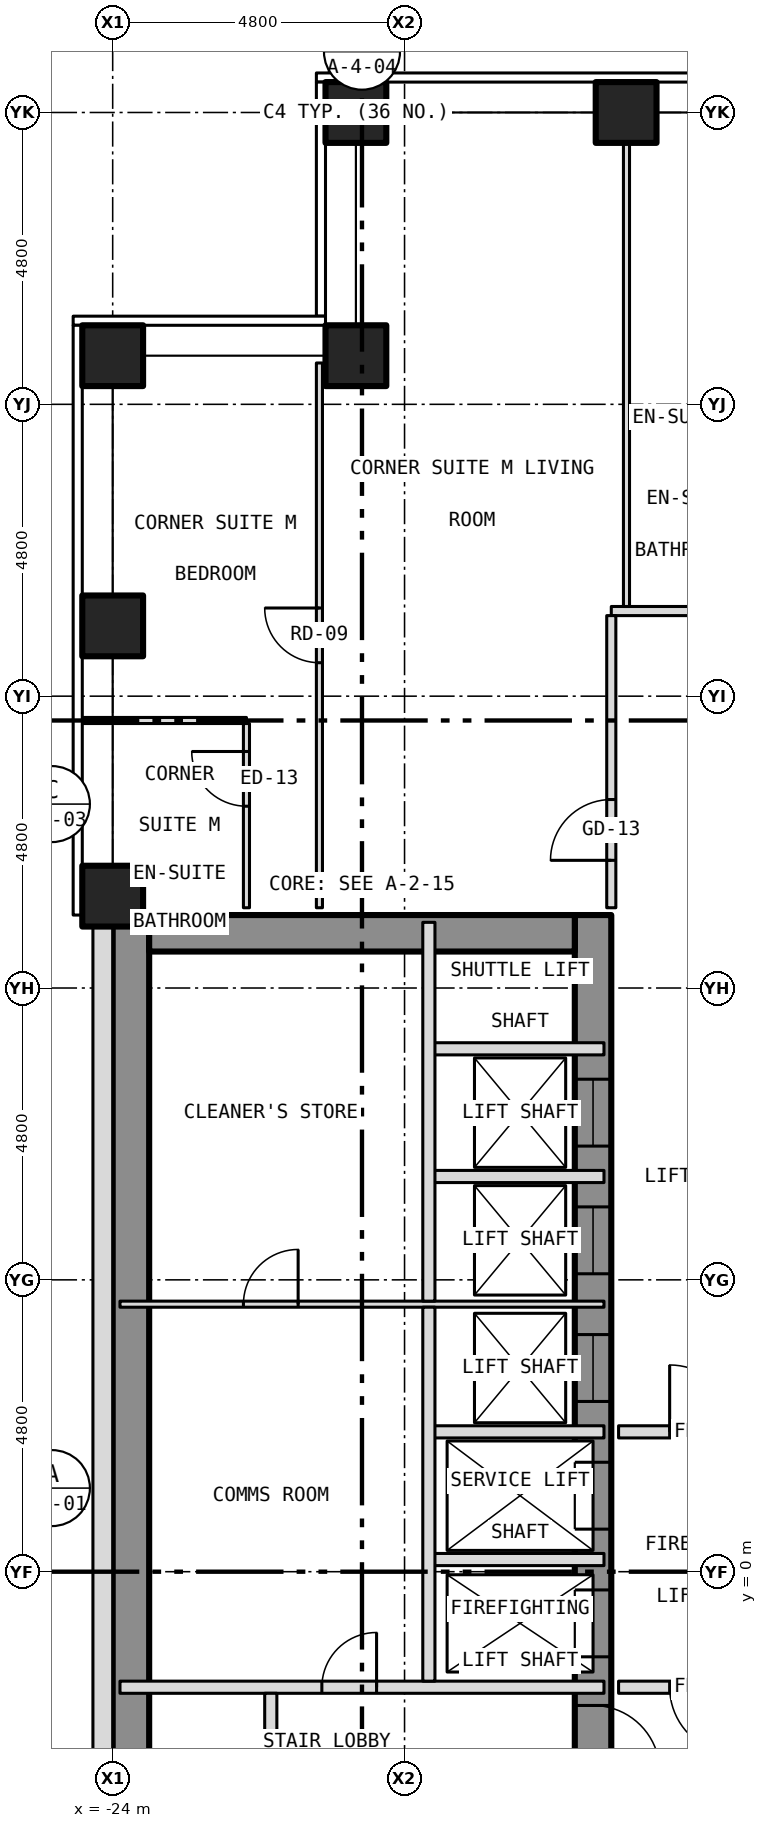
"""IFC4 building model, lengths in metres.
Left out: names, types, materials, properties, quantities, classifications, styles, units other than length and angle.
Written with IfcOpenShell. Run it as: python <this file> out.ifc"""

import sys

from ifc_helpers import new_model, si_unit, direction, frame, frame_2d, origin, origin_2d, place, context, subcontext, project, spatial, rectangle, hollow_rectangle, extrude, element, fill, save


model = new_model("IFC4")
c1 = context("Model", 3, precision=1e-05, world=origin(), true_north=direction((0.0, 1.0)))
c2 = subcontext(c1, "Body", "Model", "MODEL_VIEW")
j1 = project(units=[si_unit("LENGTHUNIT", "METRE"), si_unit("PLANEANGLEUNIT", "RADIAN")], contexts=[c1])
p1 = place(None, origin())
s1 = spatial("IfcSite", under=j1, at=p1, CompositionType="ELEMENT")
p2 = place(p1, origin())
s2 = spatial("IfcBuilding", under=s1, at=p2, CompositionType="ELEMENT")
p3 = place(p2, frame((0.0, 0.0, 56.5)))
s3 = spatial("IfcBuildingStorey", under=s2, at=p3, CompositionType="ELEMENT", Elevation=56.5)
for number, where, z_axis, x_axis in (
    (1, (-20.0, 24.0, -0.15), (0.0, 0.0, 1.0), (1.0, 0.0, 0.0)),
    (2, (-15.556, 24.0, -0.15), (0.0, 0.0, 1.0), (1.0, 0.0, 0.0)),
    (3, (-24.0, 11.111, -0.15), (0.0, 0.0, 1.0), (1.0, 0.0, 0.0)),
    (4, (-24.0, 15.556, -0.15), (0.0, 0.0, 1.0), (1.0, 0.0, 0.0)),
    (5, (-24.0, 20.0, -0.15), (0.0, 0.0, 1.0), (1.0, 0.0, 0.0)),
    (6, (-20.0, 20.0, -0.15), (0.0, 0.0, 1.0), (1.0, 0.0, 0.0)),
):
    element("IfcColumn", number, at=place(p3, frame(where, z_axis=z_axis, x_axis=x_axis)), inside=s3, PredefinedType="COLUMN", context=c2, shape_type="SweptSolid", body=[
        extrude(hollow_rectangle(XDim=1.0, YDim=1.0, WallThickness=0.06, at=origin_2d()), origin(), (0.0, 0.0, 1.0), 3.5),
    ])
p4 = place(p3, frame((-16.1, -10.8, 0.0), z_axis=(0.0, 0.0, 1.0), x_axis=(0.0, 1.0, 0.0)))
e7 = element("IfcWall", 7, at=p4, inside=s3, PredefinedType="SHEAR", context=c2, shape_type="SweptSolid", body=[
    extrude(rectangle(XDim=21.6, YDim=0.6, at=frame_2d((10.8, 0.0))), origin(), (0.0, 0.0, 1.0), 3.25),
])
p5 = place(p4, frame((9.4, 0.0, 0.0)))
e8 = element("IfcOpeningElement", 8, at=p5, cuts=e7, PredefinedType="OPENING", context=c2, shape_type="SweptSolid", body=[
    extrude(rectangle(XDim=1.1, YDim=2.1, at=frame_2d((0.55, 1.05))), frame((0.0, 0.312, 0.0), z_axis=(0.0, -1.0, 0.0), x_axis=(1.0, 0.0, 0.0)), (0.0, 0.0, 1.0), 0.624),
])
p6 = place(p4, frame((11.5, 0.0, 0.0)))
e9 = element("IfcOpeningElement", 9, at=p6, cuts=e7, PredefinedType="OPENING", context=c2, shape_type="SweptSolid", body=[
    extrude(rectangle(XDim=1.1, YDim=2.1, at=frame_2d((0.55, 1.05))), frame((0.0, 0.312, 0.0), z_axis=(0.0, -1.0, 0.0), x_axis=(1.0, 0.0, 0.0)), (0.0, 0.0, 1.0), 0.624),
])
p7 = place(p4, frame((13.6, 0.0, 0.0)))
e10 = element("IfcOpeningElement", 10, at=p7, cuts=e7, PredefinedType="OPENING", context=c2, shape_type="SweptSolid", body=[
    extrude(rectangle(XDim=1.1, YDim=2.1, at=frame_2d((0.55, 1.05))), frame((0.0, 0.312, 0.0), z_axis=(0.0, -1.0, 0.0), x_axis=(1.0, 0.0, 0.0)), (0.0, 0.0, 1.0), 0.624),
])
p8 = place(p4, frame((15.7, 0.0, 0.0)))
e11 = element("IfcOpeningElement", 11, at=p8, cuts=e7, PredefinedType="OPENING", context=c2, shape_type="SweptSolid", body=[
    extrude(rectangle(XDim=1.1, YDim=2.1, at=frame_2d((0.55, 1.05))), frame((0.0, 0.312, 0.0), z_axis=(0.0, -1.0, 0.0), x_axis=(1.0, 0.0, 0.0)), (0.0, 0.0, 1.0), 0.624),
])
p9 = place(p4, frame((17.8, 0.0, 0.0)))
e12 = element("IfcOpeningElement", 12, at=p9, cuts=e7, PredefinedType="OPENING", context=c2, shape_type="SweptSolid", body=[
    extrude(rectangle(XDim=1.1, YDim=2.1, at=frame_2d((0.55, 1.05))), frame((0.0, 0.312, 0.0), z_axis=(0.0, -1.0, 0.0), x_axis=(1.0, 0.0, 0.0)), (0.0, 0.0, 1.0), 0.624),
])
p10 = place(p4, frame((0.758, 0.0, 0.0)))
e13 = element("IfcOpeningElement", 13, at=p10, cuts=e7, PredefinedType="OPENING", context=c2, shape_type="SweptSolid", body=[
    extrude(rectangle(XDim=1.1, YDim=2.1, at=frame_2d((0.55, 1.05))), frame((0.0, 0.312, 0.0), z_axis=(0.0, -1.0, 0.0), x_axis=(1.0, 0.0, 0.0)), (0.0, 0.0, 1.0), 0.624),
])
p11 = place(p4, frame((7.5, 0.0, 0.0)))
e14 = element("IfcOpeningElement", 14, at=p11, cuts=e7, PredefinedType="OPENING", context=c2, shape_type="SweptSolid", body=[
    extrude(rectangle(XDim=1.1, YDim=2.1, at=frame_2d((0.55, 1.05))), frame((0.0, 0.312, 0.0), z_axis=(0.0, -1.0, 0.0), x_axis=(1.0, 0.0, 0.0)), (0.0, 0.0, 1.0), 0.624),
])
p12 = place(p3, frame((-23.7, -10.8, 0.0), z_axis=(0.0, 0.0, 1.0), x_axis=(0.0, 1.0, 0.0)))
e15 = element("IfcWall", 15, at=p12, inside=s3, PredefinedType="SHEAR", context=c2, shape_type="SweptSolid", body=[
    extrude(rectangle(XDim=21.6, YDim=0.6, at=frame_2d((10.8, 0.0))), origin(), (0.0, 0.0, 1.0), 3.25),
])
p13 = place(p3, frame((-23.4, 10.5, 0.0), z_axis=(0.0, 0.0, 1.0), x_axis=(1.0, 0.0, 0.0)))
e16 = element("IfcWall", 16, at=p13, inside=s3, PredefinedType="SHEAR", context=c2, shape_type="SweptSolid", body=[
    extrude(rectangle(XDim=7.0, YDim=0.6, at=frame_2d((3.5, 0.0))), origin(), (0.0, 0.0, 1.0), 3.25),
])
p14 = place(p3, frame((-24.163, 10.8, 0.0), z_axis=(0.0, 0.0, 1.0), x_axis=(0.0, -1.0, 0.0)))
e17 = element("IfcWall", 17, at=p14, inside=s3, PredefinedType="SOLIDWALL", context=c2, shape_type="SweptSolid", body=[
    extrude(rectangle(XDim=21.6, YDim=0.325, at=frame_2d((10.8, 0.0))), origin(), (0.0, 0.0, 1.0), 3.5),
])
p15 = place(p14, frame((18.05, 0.0, 1.0)))
e18 = element("IfcOpeningElement", 18, at=p15, cuts=e17, PredefinedType="OPENING", context=c2, shape_type="SweptSolid", body=[
    extrude(rectangle(XDim=0.6, YDim=1.5, at=frame_2d((0.3, 0.75))), frame((0.0, 0.175, 0.0), z_axis=(0.0, -1.0, 0.0), x_axis=(1.0, 0.0, 0.0)), (0.0, 0.0, 1.0), 0.349),
])
p16 = place(p3, frame((-23.88, -1.9, 0.0), z_axis=(0.0, 0.0, 1.0), x_axis=(1.0, 0.0, 0.0)))
e19 = element("IfcWall", 19, at=p16, inside=s3, PredefinedType="PARTITIONING", context=c2, shape_type="SweptSolid", body=[
    extrude(rectangle(XDim=7.96, YDim=0.2, at=frame_2d((3.98, 0.0))), origin(), (0.0, 0.0, 1.0), 3.25),
])
p17 = place(p16, frame((3.32, 0.0, 0.0)))
e20 = element("IfcOpeningElement", 20, at=p17, cuts=e19, PredefinedType="OPENING", context=c2, shape_type="SweptSolid", body=[
    extrude(rectangle(XDim=0.9, YDim=2.1, at=frame_2d((0.45, 1.05))), frame((0.0, 0.112, 0.0), z_axis=(0.0, -1.0, 0.0), x_axis=(1.0, 0.0, 0.0)), (0.0, 0.0, 1.0), 0.224),
])
p18 = place(p3, frame((-15.68, -1.9, 0.0), z_axis=(0.0, 0.0, 1.0), x_axis=(1.0, 0.0, 0.0)))
e21 = element("IfcWall", 21, at=p18, inside=s3, PredefinedType="PARTITIONING", context=c2, shape_type="SweptSolid", body=[
    extrude(rectangle(XDim=3.28, YDim=0.2, at=frame_2d((1.64, 0.0))), origin(), (0.0, 0.0, 1.0), 3.35),
])
p19 = place(p18, frame((0.84, 0.0, 0.0)))
e22 = element("IfcOpeningElement", 22, at=p19, cuts=e21, PredefinedType="OPENING", context=c2, shape_type="SweptSolid", body=[
    extrude(rectangle(XDim=1.1, YDim=2.1, at=frame_2d((0.55, 1.05))), frame((0.0, 0.112, 0.0), z_axis=(0.0, -1.0, 0.0), x_axis=(1.0, 0.0, 0.0)), (0.0, 0.0, 1.0), 0.224),
])
for number, where, z_axis, x_axis in (
    (23, (-18.8, 0.2, 0.0), (0.0, 0.0, 1.0), (1.0, 0.0, 0.0)),
    (24, (-18.8, 2.3, 0.0), (0.0, 0.0, 1.0), (1.0, 0.0, 0.0)),
):
    element("IfcWall", number, at=place(p3, frame(where, z_axis=z_axis, x_axis=x_axis)), inside=s3, PredefinedType="PARTITIONING", context=c2, shape_type="SweptSolid", body=[
        extrude(rectangle(XDim=2.88, YDim=0.2, at=frame_2d((1.44, 0.0))), origin(), (0.0, 0.0, 1.0), 3.25),
    ])
p20 = place(p3, frame((-15.68, 2.3, 0.0), z_axis=(0.0, 0.0, 1.0), x_axis=(1.0, 0.0, 0.0)))
e25 = element("IfcWall", 25, at=p20, inside=s3, PredefinedType="PARTITIONING", context=c2, shape_type="SweptSolid", body=[
    extrude(rectangle(XDim=3.28, YDim=0.2, at=frame_2d((1.64, 0.0))), origin(), (0.0, 0.0, 1.0), 3.35),
])
p21 = place(p20, frame((0.84, 0.0, 0.0)))
e26 = element("IfcOpeningElement", 26, at=p21, cuts=e25, PredefinedType="OPENING", context=c2, shape_type="SweptSolid", body=[
    extrude(rectangle(XDim=1.1, YDim=2.1, at=frame_2d((0.55, 1.05))), frame((0.0, 0.112, 0.0), z_axis=(0.0, -1.0, 0.0), x_axis=(1.0, 0.0, 0.0)), (0.0, 0.0, 1.0), 0.224),
])
p22 = place(p3, frame((-23.88, 4.4, 0.0), z_axis=(0.0, 0.0, 1.0), x_axis=(1.0, 0.0, 0.0)))
e27 = element("IfcWall", 27, at=p22, inside=s3, PredefinedType="PARTITIONING", context=c2, shape_type="SweptSolid", body=[
    extrude(rectangle(XDim=7.96, YDim=0.1, at=frame_2d((3.98, 0.0))), origin(), (0.0, 0.0, 1.0), 3.25),
])
p23 = place(p22, frame((2.03, 0.0, 0.0)))
e28 = element("IfcOpeningElement", 28, at=p23, cuts=e27, PredefinedType="OPENING", context=c2, shape_type="SweptSolid", body=[
    extrude(rectangle(XDim=0.9, YDim=2.1, at=frame_2d((0.45, 1.05))), frame((0.0, 0.062, 0.0), z_axis=(0.0, -1.0, 0.0), x_axis=(1.0, 0.0, 0.0)), (0.0, 0.0, 1.0), 0.124),
])
for number, where, z_axis, x_axis in (
    (29, (-18.8, 6.5, 0.0), (0.0, 0.0, 1.0), (1.0, 0.0, 0.0)),
    (30, (-18.8, 8.6, 0.0), (0.0, 0.0, 1.0), (1.0, 0.0, 0.0)),
):
    element("IfcWall", number, at=place(p3, frame(where, z_axis=z_axis, x_axis=x_axis)), inside=s3, PredefinedType="PARTITIONING", context=c2, shape_type="SweptSolid", body=[
        extrude(rectangle(XDim=2.88, YDim=0.2, at=frame_2d((1.44, 0.0))), origin(), (0.0, 0.0, 1.0), 3.25),
    ])
p24 = place(p3, frame((-24.53, 14.0, 0.0), z_axis=(0.0, 0.0, 1.0), x_axis=(1.0, 0.0, 0.0)))
e31 = element("IfcWall", 31, at=p24, inside=s3, PredefinedType="PARTITIONING", context=c2, shape_type="SweptSolid", body=[
    extrude(rectangle(XDim=2.73, YDim=0.1, at=frame_2d((1.365, 0.0))), origin(), (0.0, 0.0, 1.0), 3.35),
])
p25 = place(p3, frame((-15.8, 15.8, 0.0), z_axis=(0.0, 0.0, 1.0), x_axis=(1.0, 0.0, 0.0)))
e32 = element("IfcWall", 32, at=p25, inside=s3, PredefinedType="PARTITIONING", context=c2, shape_type="SweptSolid", body=[
    extrude(rectangle(XDim=31.6, YDim=0.15, at=frame_2d((15.8, 0.0))), origin(), (0.0, 0.0, 1.0), 3.35),
])
p26 = place(p25, frame((4.178, 0.0, 0.0)))
e33 = element("IfcOpeningElement", 33, at=p26, cuts=e32, PredefinedType="OPENING", context=c2, shape_type="SweptSolid", body=[
    extrude(rectangle(XDim=1.0, YDim=2.1, at=frame_2d((0.5, 1.05))), frame((0.0, 0.087, 0.0), z_axis=(0.0, -1.0, 0.0), x_axis=(1.0, 0.0, 0.0)), (0.0, 0.0, 1.0), 0.174),
])
p27 = place(p25, frame((9.734, 0.0, 0.0)))
e34 = element("IfcOpeningElement", 34, at=p27, cuts=e32, PredefinedType="OPENING", context=c2, shape_type="SweptSolid", body=[
    extrude(rectangle(XDim=1.0, YDim=2.1, at=frame_2d((0.5, 1.05))), frame((0.0, 0.087, 0.0), z_axis=(0.0, -1.0, 0.0), x_axis=(1.0, 0.0, 0.0)), (0.0, 0.0, 1.0), 0.174),
])
p28 = place(p25, frame((14.178, 0.0, 0.0)))
e35 = element("IfcOpeningElement", 35, at=p28, cuts=e32, PredefinedType="OPENING", context=c2, shape_type="SweptSolid", body=[
    extrude(rectangle(XDim=1.0, YDim=2.1, at=frame_2d((0.5, 1.05))), frame((0.0, 0.087, 0.0), z_axis=(0.0, -1.0, 0.0), x_axis=(1.0, 0.0, 0.0)), (0.0, 0.0, 1.0), 0.174),
])
p29 = place(p25, frame((17.534, 0.0, 0.0)))
e36 = element("IfcOpeningElement", 36, at=p29, cuts=e32, PredefinedType="OPENING", context=c2, shape_type="SweptSolid", body=[
    extrude(rectangle(XDim=1.0, YDim=2.1, at=frame_2d((0.5, 1.05))), frame((0.0, 0.087, 0.0), z_axis=(0.0, -1.0, 0.0), x_axis=(1.0, 0.0, 0.0)), (0.0, 0.0, 1.0), 0.174),
])
p30 = place(p25, frame((25.289, 0.0, 0.0)))
e37 = element("IfcOpeningElement", 37, at=p30, cuts=e32, PredefinedType="OPENING", context=c2, shape_type="SweptSolid", body=[
    extrude(rectangle(XDim=1.0, YDim=2.1, at=frame_2d((0.5, 1.05))), frame((0.0, 0.087, 0.0), z_axis=(0.0, -1.0, 0.0), x_axis=(1.0, 0.0, 0.0)), (0.0, 0.0, 1.0), 0.174),
])
p31 = place(p25, frame((29.733, 0.0, 0.0)))
e38 = element("IfcOpeningElement", 38, at=p31, cuts=e32, PredefinedType="OPENING", context=c2, shape_type="SweptSolid", body=[
    extrude(rectangle(XDim=1.0, YDim=2.1, at=frame_2d((0.5, 1.05))), frame((0.0, 0.087, 0.0), z_axis=(0.0, -1.0, 0.0), x_axis=(1.0, 0.0, 0.0)), (0.0, 0.0, 1.0), 0.174),
])
p32 = place(p3, frame((-15.55, 19.0, 0.0), z_axis=(0.0, 0.0, 1.0), x_axis=(1.0, 0.0, 0.0)))
e39 = element("IfcWall", 39, at=p32, inside=s3, PredefinedType="PARTITIONING", context=c2, shape_type="SweptSolid", body=[
    extrude(rectangle(XDim=2.2, YDim=0.1, at=frame_2d((1.1, 0.0))), origin(), (0.0, 0.0, 1.0), 3.35),
])
p33 = place(p3, frame((-21.8, 10.92, 0.0), z_axis=(0.0, 0.0, 1.0), x_axis=(0.0, 1.0, 0.0)))
e40 = element("IfcWall", 40, at=p33, inside=s3, PredefinedType="PARTITIONING", context=c2, shape_type="SweptSolid", body=[
    extrude(rectangle(XDim=3.03, YDim=0.1, at=frame_2d((1.515, 0.0))), origin(), (0.0, 0.0, 1.0), 3.35),
])
p34 = place(p33, frame((1.67, 0.0, 0.0)))
e41 = element("IfcOpeningElement", 41, at=p34, cuts=e40, PredefinedType="OPENING", context=c2, shape_type="SweptSolid", body=[
    extrude(rectangle(XDim=0.9, YDim=2.1, at=frame_2d((0.45, 1.05))), frame((0.0, 0.062, 0.0), z_axis=(0.0, -1.0, 0.0), x_axis=(1.0, 0.0, 0.0)), (0.0, 0.0, 1.0), 0.124),
])
p35 = place(p3, frame((-21.4, -10.68, 0.0), z_axis=(0.0, 0.0, 1.0), x_axis=(0.0, 1.0, 0.0)))
e42 = element("IfcWall", 42, at=p35, inside=s3, PredefinedType="PARTITIONING", context=c2, shape_type="SweptSolid", body=[
    extrude(rectangle(XDim=8.68, YDim=0.2, at=frame_2d((4.34, 0.0))), origin(), (0.0, 0.0, 1.0), 3.25),
])
p36 = place(p35, frame((3.88, 0.0, 0.0)))
e43 = element("IfcOpeningElement", 43, at=p36, cuts=e42, PredefinedType="OPENING", context=c2, shape_type="SweptSolid", body=[
    extrude(rectangle(XDim=0.9, YDim=2.1, at=frame_2d((0.45, 1.05))), frame((0.0, 0.112, 0.0), z_axis=(0.0, -1.0, 0.0), x_axis=(1.0, 0.0, 0.0)), (0.0, 0.0, 1.0), 0.224),
])
p37 = place(p3, frame((-20.6, 10.92, 0.0), z_axis=(0.0, 0.0, 1.0), x_axis=(0.0, 1.0, 0.0)))
e44 = element("IfcWall", 44, at=p37, inside=s3, PredefinedType="PARTITIONING", context=c2, shape_type="SweptSolid", body=[
    extrude(rectangle(XDim=8.96, YDim=0.1, at=frame_2d((4.48, 0.0))), origin(), (0.0, 0.0, 1.0), 3.35),
])
p38 = place(p37, frame((4.03, 0.0, 0.0)))
e45 = element("IfcOpeningElement", 45, at=p38, cuts=e44, PredefinedType="OPENING", context=c2, shape_type="SweptSolid", body=[
    extrude(rectangle(XDim=0.9, YDim=2.1, at=frame_2d((0.45, 1.05))), frame((0.0, 0.062, 0.0), z_axis=(0.0, -1.0, 0.0), x_axis=(1.0, 0.0, 0.0)), (0.0, 0.0, 1.0), 0.124),
])
p39 = place(p3, frame((-18.8, -1.8, 0.0), z_axis=(0.0, 0.0, 1.0), x_axis=(0.0, 1.0, 0.0)))
e46 = element("IfcWall", 46, at=p39, inside=s3, PredefinedType="PARTITIONING", context=c2, shape_type="SweptSolid", body=[
    extrude(rectangle(XDim=6.15, YDim=0.2, at=frame_2d((3.075, 0.0))), origin(), (0.0, 0.0, 1.0), 3.25),
])
p40 = place(p3, frame((-18.8, 4.45, 0.0), z_axis=(0.0, 0.0, 1.0), x_axis=(0.0, 1.0, 0.0)))
e47 = element("IfcWall", 47, at=p40, inside=s3, PredefinedType="PARTITIONING", context=c2, shape_type="SweptSolid", body=[
    extrude(rectangle(XDim=6.23, YDim=0.2, at=frame_2d((3.115, 0.0))), origin(), (0.0, 0.0, 1.0), 3.25),
])
p41 = place(p3, frame((-15.8, 10.92, 0.0), z_axis=(0.0, 0.0, 1.0), x_axis=(0.0, 1.0, 0.0)))
e48 = element("IfcWall", 48, at=p41, inside=s3, PredefinedType="PARTITIONING", context=c2, shape_type="SweptSolid", body=[
    extrude(rectangle(XDim=4.805, YDim=0.15, at=frame_2d((2.403, 0.0))), origin(), (0.0, 0.0, 1.0), 3.35),
])
p42 = place(p41, frame((0.78, 0.0, 0.0)))
e49 = element("IfcOpeningElement", 49, at=p42, cuts=e48, PredefinedType="OPENING", context=c2, shape_type="SweptSolid", body=[
    extrude(rectangle(XDim=1.0, YDim=2.1, at=frame_2d((0.5, 1.05))), frame((0.0, 0.087, 0.0), z_axis=(0.0, -1.0, 0.0), x_axis=(1.0, 0.0, 0.0)), (0.0, 0.0, 1.0), 0.174),
])
p43 = place(p3, frame((-15.55, 15.875, 0.0), z_axis=(0.0, 0.0, 1.0), x_axis=(0.0, 1.0, 0.0)))
e50 = element("IfcWall", 50, at=p43, inside=s3, PredefinedType="PARTITIONING", context=c2, shape_type="SweptSolid", body=[
    extrude(rectangle(XDim=8.005, YDim=0.1, at=frame_2d((4.002, 0.0))), origin(), (0.0, 0.0, 1.0), 3.35),
])
p44 = place(p5, origin())
e51 = element("IfcDoor", 51, at=p44, inside=s3, OperationType="SLIDING_TO_LEFT", PredefinedType="DOOR", context=c2, shape_type="SweptSolid", body=[
    extrude(rectangle(XDim=1.1, YDim=2.1, at=frame_2d((0.55, 1.05))), frame((0.0, 0.025, 0.0), z_axis=(0.0, -1.0, 0.0), x_axis=(1.0, 0.0, 0.0)), (0.0, 0.0, 1.0), 0.05),
])
fill(e8, e51)
p45 = place(p6, origin())
e52 = element("IfcDoor", 52, at=p45, inside=s3, OperationType="SLIDING_TO_LEFT", PredefinedType="DOOR", context=c2, shape_type="SweptSolid", body=[
    extrude(rectangle(XDim=1.1, YDim=2.1, at=frame_2d((0.55, 1.05))), frame((0.0, 0.025, 0.0), z_axis=(0.0, -1.0, 0.0), x_axis=(1.0, 0.0, 0.0)), (0.0, 0.0, 1.0), 0.05),
])
fill(e9, e52)
p46 = place(p7, origin())
e53 = element("IfcDoor", 53, at=p46, inside=s3, OperationType="SLIDING_TO_LEFT", PredefinedType="DOOR", context=c2, shape_type="SweptSolid", body=[
    extrude(rectangle(XDim=1.1, YDim=2.1, at=frame_2d((0.55, 1.05))), frame((0.0, 0.025, 0.0), z_axis=(0.0, -1.0, 0.0), x_axis=(1.0, 0.0, 0.0)), (0.0, 0.0, 1.0), 0.05),
])
fill(e10, e53)
p47 = place(p8, origin())
e54 = element("IfcDoor", 54, at=p47, inside=s3, OperationType="SLIDING_TO_LEFT", PredefinedType="DOOR", context=c2, shape_type="SweptSolid", body=[
    extrude(rectangle(XDim=1.1, YDim=2.1, at=frame_2d((0.55, 1.05))), frame((0.0, 0.025, 0.0), z_axis=(0.0, -1.0, 0.0), x_axis=(1.0, 0.0, 0.0)), (0.0, 0.0, 1.0), 0.05),
])
fill(e11, e54)
p48 = place(p9, origin())
e55 = element("IfcDoor", 55, at=p48, inside=s3, OperationType="SLIDING_TO_LEFT", PredefinedType="DOOR", context=c2, shape_type="SweptSolid", body=[
    extrude(rectangle(XDim=1.1, YDim=2.1, at=frame_2d((0.55, 1.05))), frame((0.0, 0.025, 0.0), z_axis=(0.0, -1.0, 0.0), x_axis=(1.0, 0.0, 0.0)), (0.0, 0.0, 1.0), 0.05),
])
fill(e12, e55)
p49 = place(p11, origin())
e56 = element("IfcDoor", 56, at=p49, inside=s3, OperationType="SINGLE_SWING_LEFT", PredefinedType="DOOR", context=c2, shape_type="SweptSolid", body=[
    extrude(rectangle(XDim=1.1, YDim=2.1, at=frame_2d((0.55, 1.05))), frame((0.0, 0.025, 0.0), z_axis=(0.0, -1.0, 0.0), x_axis=(1.0, 0.0, 0.0)), (0.0, 0.0, 1.0), 0.05),
])
fill(e14, e56)
p50 = place(p17, origin())
e57 = element("IfcDoor", 57, at=p50, inside=s3, OperationType="SINGLE_SWING_RIGHT", PredefinedType="DOOR", context=c2, shape_type="SweptSolid", body=[
    extrude(rectangle(XDim=0.9, YDim=2.1, at=frame_2d((0.45, 1.05))), frame((0.0, 0.025, 0.0), z_axis=(0.0, -1.0, 0.0), x_axis=(1.0, 0.0, 0.0)), (0.0, 0.0, 1.0), 0.05),
])
fill(e20, e57)
p51 = place(p23, origin())
e58 = element("IfcDoor", 58, at=p51, inside=s3, OperationType="SINGLE_SWING_RIGHT", PredefinedType="DOOR", context=c2, shape_type="SweptSolid", body=[
    extrude(rectangle(XDim=0.9, YDim=2.1, at=frame_2d((0.45, 1.05))), frame((0.0, 0.025, 0.0), z_axis=(0.0, -1.0, 0.0), x_axis=(1.0, 0.0, 0.0)), (0.0, 0.0, 1.0), 0.05),
])
fill(e28, e58)
p52 = place(p21, origin())
e59 = element("IfcDoor", 59, at=p52, inside=s3, OperationType="SINGLE_SWING_LEFT", PredefinedType="DOOR", context=c2, shape_type="SweptSolid", body=[
    extrude(rectangle(XDim=1.1, YDim=2.1, at=frame_2d((0.55, 1.05))), frame((0.0, 0.025, 0.0), z_axis=(0.0, -1.0, 0.0), x_axis=(1.0, 0.0, 0.0)), (0.0, 0.0, 1.0), 0.05),
])
fill(e26, e59)
p53 = place(p19, origin())
e60 = element("IfcDoor", 60, at=p53, inside=s3, OperationType="SINGLE_SWING_RIGHT", PredefinedType="DOOR", context=c2, shape_type="SweptSolid", body=[
    extrude(rectangle(XDim=1.1, YDim=2.1, at=frame_2d((0.55, 1.05))), frame((0.0, 0.025, 0.0), z_axis=(0.0, -1.0, 0.0), x_axis=(1.0, 0.0, 0.0)), (0.0, 0.0, 1.0), 0.05),
])
fill(e22, e60)
p54 = place(p42, origin())
e61 = element("IfcDoor", 61, at=p54, inside=s3, OperationType="SINGLE_SWING_LEFT", PredefinedType="DOOR", context=c2, shape_type="SweptSolid", body=[
    extrude(rectangle(XDim=1.0, YDim=2.1, at=frame_2d((0.5, 1.05))), frame((0.0, 0.025, 0.0), z_axis=(0.0, -1.0, 0.0), x_axis=(1.0, 0.0, 0.0)), (0.0, 0.0, 1.0), 0.05),
])
fill(e49, e61)
p55 = place(p38, origin())
e62 = element("IfcDoor", 62, at=p55, inside=s3, OperationType="SINGLE_SWING_RIGHT", PredefinedType="DOOR", context=c2, shape_type="SweptSolid", body=[
    extrude(rectangle(XDim=0.9, YDim=2.1, at=frame_2d((0.45, 1.05))), frame((0.0, 0.025, 0.0), z_axis=(0.0, -1.0, 0.0), x_axis=(1.0, 0.0, 0.0)), (0.0, 0.0, 1.0), 0.05),
])
fill(e45, e62)
p56 = place(p34, origin())
e63 = element("IfcDoor", 63, at=p56, inside=s3, OperationType="SINGLE_SWING_RIGHT", PredefinedType="DOOR", context=c2, shape_type="SweptSolid", body=[
    extrude(rectangle(XDim=0.9, YDim=2.1, at=frame_2d((0.45, 1.05))), frame((0.0, 0.025, 0.0), z_axis=(0.0, -1.0, 0.0), x_axis=(1.0, 0.0, 0.0)), (0.0, 0.0, 1.0), 0.05),
])
fill(e41, e63)
save(model, sys.argv[1])
